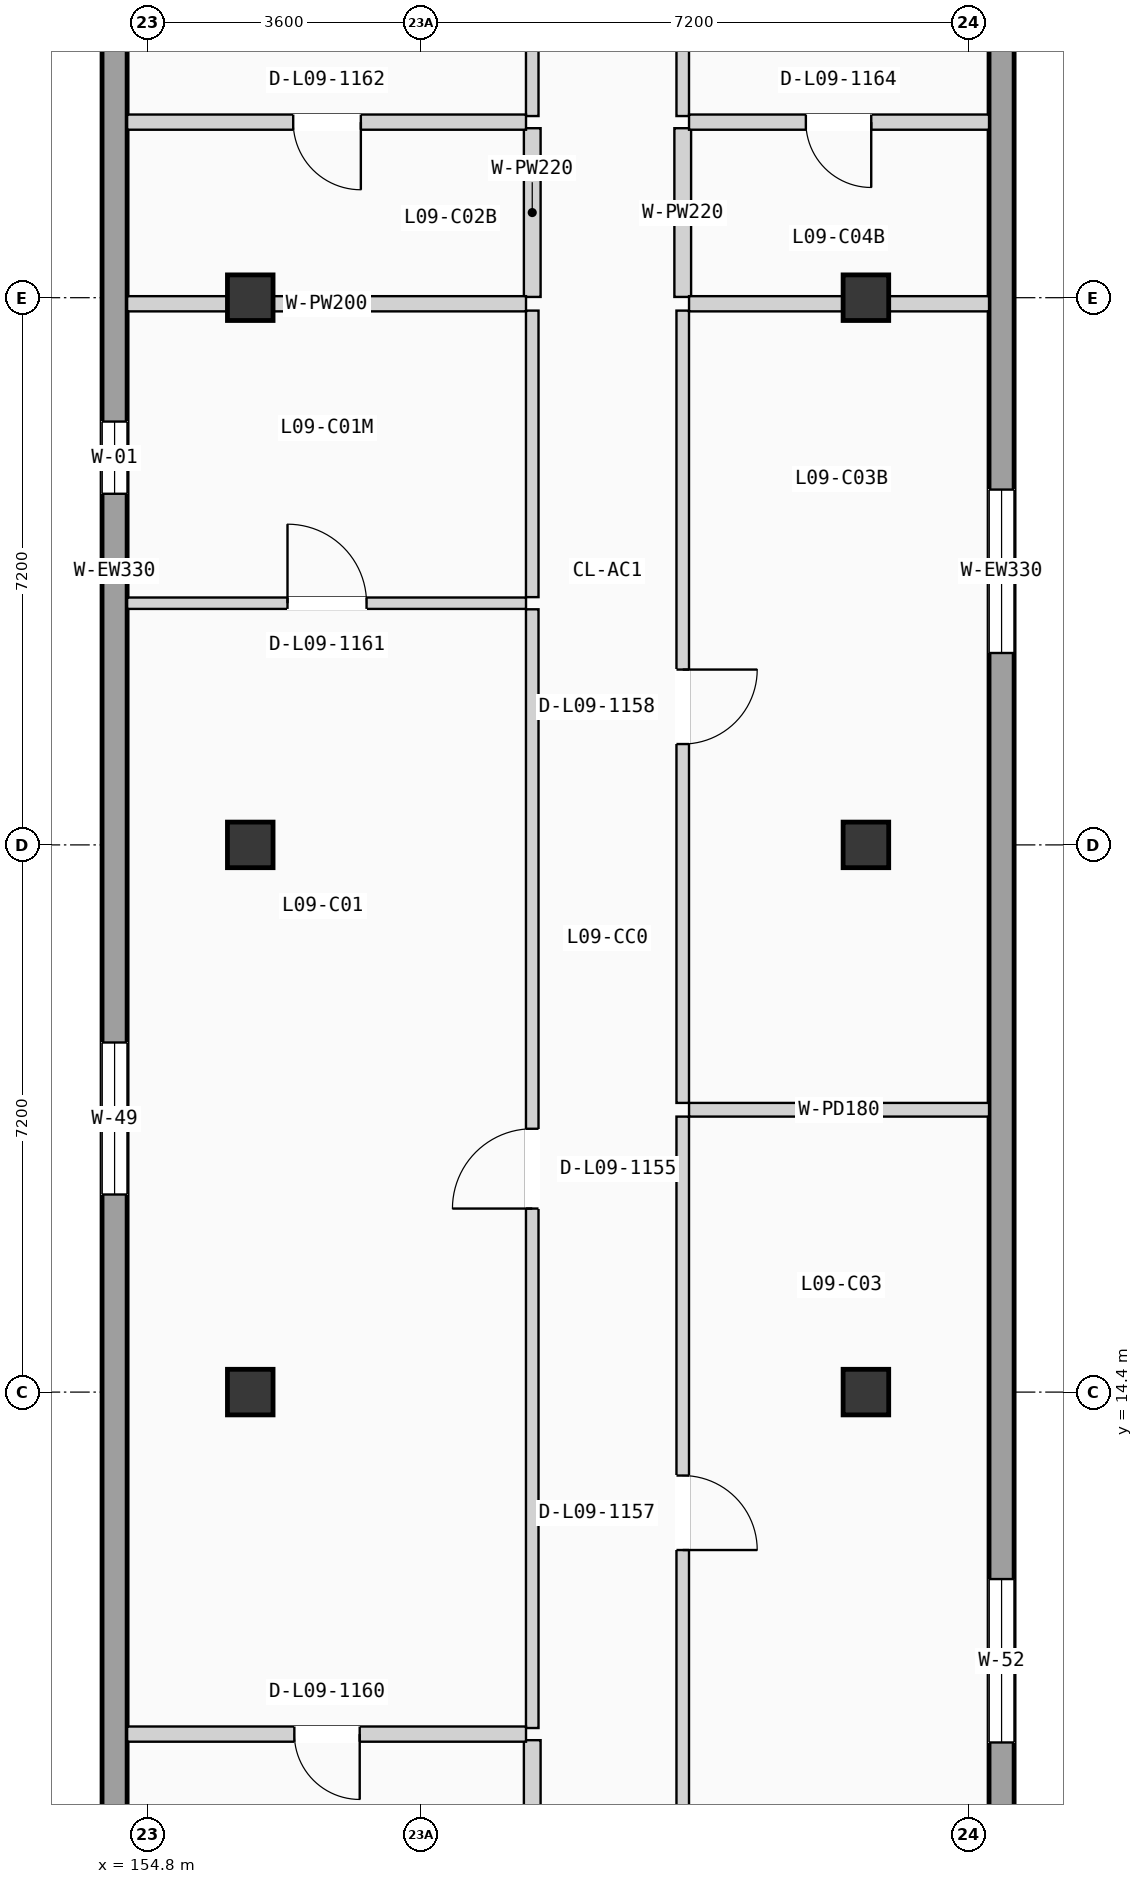
"""IFC4 building model, lengths in metres.
Left out: names, types, materials, properties, quantities, classifications, styles, units other than length and angle.
Written with IfcOpenShell. Run it as: python <this file> out.ifc"""

import sys

from ifc_helpers import new_model, si_unit, direction, frame, frame_2d, origin, origin_2d, place, context, subcontext, project, spatial, rectangle, extrude, element, fill, save


model = new_model("IFC4")
c1 = context("Model", 3, precision=1e-05, world=origin(), true_north=direction((0.0, 1.0)))
c2 = subcontext(c1, "Body", "Model", "MODEL_VIEW")
j1 = project(units=[si_unit("LENGTHUNIT", "METRE"), si_unit("PLANEANGLEUNIT", "RADIAN")], contexts=[c1])
p1 = place(None, origin())
s1 = spatial("IfcSite", under=j1, at=p1, CompositionType="ELEMENT")
p2 = place(p1, origin())
s2 = spatial("IfcBuilding", under=s1, at=p2, CompositionType="ELEMENT")
p3 = place(p2, frame((0.0, 0.0, 30.975)))
s3 = spatial("IfcBuildingStorey", under=s2, at=p3, CompositionType="ELEMENT", Elevation=30.975)
for number, where, z_axis, x_axis in (
    (1, (156.15, 14.4, 0.0), (0.0, 0.0, 1.0), (1.0, 0.0, 0.0)),
    (2, (156.15, 21.6, 0.0), (0.0, 0.0, 1.0), (1.0, 0.0, 0.0)),
    (3, (156.15, 28.8, 0.0), (0.0, 0.0, 1.0), (1.0, 0.0, 0.0)),
    (4, (164.25, 14.4, 0.0), (0.0, 0.0, 1.0), (1.0, 0.0, 0.0)),
    (5, (164.25, 21.6, 0.0), (0.0, 0.0, 1.0), (1.0, 0.0, 0.0)),
    (6, (164.25, 28.8, 0.0), (0.0, 0.0, 1.0), (1.0, 0.0, 0.0)),
):
    element("IfcColumn", number, at=place(p3, frame(where, z_axis=z_axis, x_axis=x_axis)), inside=s3, PredefinedType="COLUMN", context=c2, shape_type="SweptSolid", body=[
        extrude(rectangle(XDim=0.6, YDim=0.6, at=origin_2d()), origin(), (0.0, 0.0, 1.0), 3.15),
    ])
p4 = place(p3, frame((154.365, 0.33, 0.0), z_axis=(0.0, 0.0, 1.0), x_axis=(0.0, 1.0, 0.0)))
e7 = element("IfcWall", 7, at=p4, inside=s3, PredefinedType="SOLIDWALL", context=c2, shape_type="SweptSolid", body=[
    extrude(rectangle(XDim=49.74, YDim=0.33, at=frame_2d((24.87, 0.0))), origin(), (0.0, 0.0, 1.0), 2.9),
])
p5 = place(p4, frame((16.67, 0.0, 0.515)))
e8 = element("IfcOpeningElement", 8, at=p5, cuts=e7, PredefinedType="OPENING", context=c2, shape_type="SweptSolid", body=[
    extrude(rectangle(XDim=2.0, YDim=1.65, at=frame_2d((1.0, 0.825))), frame((0.0, 0.175, 0.0), z_axis=(0.0, -1.0, 0.0), x_axis=(1.0, 0.0, 0.0)), (0.0, 0.0, 1.0), 0.35),
])
p6 = place(p4, frame((25.89, 0.0, 0.85)))
e9 = element("IfcOpeningElement", 9, at=p6, cuts=e7, PredefinedType="OPENING", context=c2, shape_type="SweptSolid", body=[
    extrude(rectangle(XDim=0.95, YDim=1.2, at=frame_2d((0.475, 0.6))), frame((0.0, 0.175, 0.0), z_axis=(0.0, -1.0, 0.0), x_axis=(1.0, 0.0, 0.0)), (0.0, 0.0, 1.0), 0.35),
])
p7 = place(p4, frame((32.055, 0.0, 0.9)))
e10 = element("IfcOpeningElement", 10, at=p7, cuts=e7, PredefinedType="OPENING", context=c2, shape_type="SweptSolid", body=[
    extrude(rectangle(XDim=2.15, YDim=1.2, at=frame_2d((1.075, 0.6))), frame((0.0, 0.175, 0.0), z_axis=(0.0, -1.0, 0.0), x_axis=(1.0, 0.0, 0.0)), (0.0, 0.0, 1.0), 0.35),
])
p8 = place(p3, frame((166.035, 0.33, 0.0), z_axis=(0.0, 0.0, 1.0), x_axis=(0.0, 1.0, 0.0)))
e11 = element("IfcWall", 11, at=p8, inside=s3, PredefinedType="SOLIDWALL", context=c2, shape_type="SweptSolid", body=[
    extrude(rectangle(XDim=49.74, YDim=0.33, at=frame_2d((24.87, 0.0))), origin(), (0.0, 0.0, 1.0), 2.9),
])
p9 = place(p8, frame((9.46, 0.0, 0.815)))
e12 = element("IfcOpeningElement", 12, at=p9, cuts=e11, PredefinedType="OPENING", context=c2, shape_type="SweptSolid", body=[
    extrude(rectangle(XDim=2.15, YDim=1.35, at=frame_2d((1.075, 0.675))), frame((0.0, 0.175, 0.0), z_axis=(0.0, -1.0, 0.0), x_axis=(1.0, 0.0, 0.0)), (0.0, 0.0, 1.0), 0.35),
])
p10 = place(p8, frame((23.795, 0.0, 0.665)))
e13 = element("IfcOpeningElement", 13, at=p10, cuts=e11, PredefinedType="OPENING", context=c2, shape_type="SweptSolid", body=[
    extrude(rectangle(XDim=2.15, YDim=1.5, at=frame_2d((1.075, 0.75))), frame((0.0, 0.175, 0.0), z_axis=(0.0, -1.0, 0.0), x_axis=(1.0, 0.0, 0.0)), (0.0, 0.0, 1.0), 0.35),
])
p11 = place(p8, frame((32.055, 0.0, 0.515)))
e14 = element("IfcOpeningElement", 14, at=p11, cuts=e11, PredefinedType="OPENING", context=c2, shape_type="SweptSolid", body=[
    extrude(rectangle(XDim=2.15, YDim=1.65, at=frame_2d((1.075, 0.825))), frame((0.0, 0.175, 0.0), z_axis=(0.0, -1.0, 0.0), x_axis=(1.0, 0.0, 0.0)), (0.0, 0.0, 1.0), 0.35),
])
p12 = place(p3, frame((159.86, 7.6, 0.0), z_axis=(0.0, 0.0, 1.0), x_axis=(0.0, 1.0, 0.0)))
e15 = element("IfcWall", 15, at=p12, inside=s3, PredefinedType="PLUMBINGWALL", context=c2, shape_type="SweptSolid", body=[
    extrude(rectangle(XDim=2.22, YDim=0.22, at=frame_2d((1.11, 0.0))), origin(), (0.0, 0.0, 1.0), 2.87),
])
p13 = place(p3, frame((159.86, 9.98, 0.0), z_axis=(0.0, 0.0, 1.0), x_axis=(0.0, 1.0, 0.0)))
e16 = element("IfcWall", 16, at=p13, inside=s3, PredefinedType="PARTITIONING", context=c2, shape_type="SweptSolid", body=[
    extrude(rectangle(XDim=14.72, YDim=0.165, at=frame_2d((7.36, 0.0))), origin(), (0.0, 0.0, 1.0), 2.87),
])
p14 = place(p13, frame((6.835, 0.0, 0.0)))
e17 = element("IfcOpeningElement", 17, at=p14, cuts=e16, PredefinedType="OPENING", context=c2, shape_type="SweptSolid", body=[
    extrude(rectangle(XDim=1.05, YDim=2.13, at=frame_2d((0.525, 1.065))), frame((0.0, 0.093, 0.0), z_axis=(0.0, -1.0, 0.0), x_axis=(1.0, 0.0, 0.0)), (0.0, 0.0, 1.0), 0.185),
])
p15 = place(p3, frame((159.86, 24.86, 0.0), z_axis=(0.0, 0.0, 1.0), x_axis=(0.0, 1.0, 0.0)))
e18 = element("IfcWall", 18, at=p15, inside=s3, PredefinedType="PARTITIONING", context=c2, shape_type="SweptSolid", body=[
    extrude(rectangle(XDim=3.77, YDim=0.165, at=frame_2d((1.885, 0.0))), origin(), (0.0, 0.0, 1.0), 2.87),
])
p16 = place(p3, frame((159.86, 28.81, 0.0), z_axis=(0.0, 0.0, 1.0), x_axis=(0.0, 1.0, 0.0)))
e19 = element("IfcWall", 19, at=p16, inside=s3, PredefinedType="PLUMBINGWALL", context=c2, shape_type="SweptSolid", body=[
    extrude(rectangle(XDim=2.22, YDim=0.22, at=frame_2d((1.11, 0.0))), origin(), (0.0, 0.0, 1.0), 2.87),
])
p17 = place(p3, frame((159.86, 31.19, 0.0), z_axis=(0.0, 0.0, 1.0), x_axis=(0.0, 1.0, 0.0)))
e20 = element("IfcWall", 20, at=p17, inside=s3, PredefinedType="PARTITIONING", context=c2, shape_type="SweptSolid", body=[
    extrude(rectangle(XDim=7.68, YDim=0.165, at=frame_2d((3.84, 0.0))), origin(), (0.0, 0.0, 1.0), 2.87),
])
p18 = place(p17, frame((3.315, 0.0, 0.0)))
e21 = element("IfcOpeningElement", 21, at=p18, cuts=e20, PredefinedType="OPENING", context=c2, shape_type="SweptSolid", body=[
    extrude(rectangle(XDim=1.05, YDim=2.13, at=frame_2d((0.525, 1.065))), frame((0.0, 0.093, 0.0), z_axis=(0.0, -1.0, 0.0), x_axis=(1.0, 0.0, 0.0)), (0.0, 0.0, 1.0), 0.185),
])
p19 = place(p3, frame((161.84, 7.545, 0.0), z_axis=(0.0, 0.0, 1.0), x_axis=(0.0, 1.0, 0.0)))
e22 = element("IfcWall", 22, at=p19, inside=s3, PredefinedType="PARTITIONING", context=c2, shape_type="SweptSolid", body=[
    extrude(rectangle(XDim=10.48, YDim=0.165, at=frame_2d((5.24, 0.0))), origin(), (0.0, 0.0, 1.0), 2.87),
])
p20 = place(p19, frame((4.777, 0.0, 0.0)))
e23 = element("IfcOpeningElement", 23, at=p20, cuts=e22, PredefinedType="OPENING", context=c2, shape_type="SweptSolid", body=[
    extrude(rectangle(XDim=0.98, YDim=2.08, at=frame_2d((0.49, 1.04))), frame((0.0, 0.093, 0.0), z_axis=(0.0, -1.0, 0.0), x_axis=(1.0, 0.0, 0.0)), (0.0, 0.0, 1.0), 0.185),
])
p21 = place(p3, frame((161.84, 18.205, 0.0), z_axis=(0.0, 0.0, 1.0), x_axis=(0.0, 1.0, 0.0)))
e24 = element("IfcWall", 24, at=p21, inside=s3, PredefinedType="PARTITIONING", context=c2, shape_type="SweptSolid", body=[
    extrude(rectangle(XDim=10.425, YDim=0.165, at=frame_2d((5.212, 0.0))), origin(), (0.0, 0.0, 1.0), 2.87),
])
p22 = place(p21, frame((4.722, 0.0, 0.0)))
e25 = element("IfcOpeningElement", 25, at=p22, cuts=e24, PredefinedType="OPENING", context=c2, shape_type="SweptSolid", body=[
    extrude(rectangle(XDim=0.98, YDim=2.08, at=frame_2d((0.49, 1.04))), frame((0.0, 0.093, 0.0), z_axis=(0.0, -1.0, 0.0), x_axis=(1.0, 0.0, 0.0)), (0.0, 0.0, 1.0), 0.185),
])
p23 = place(p3, frame((161.84, 28.81, 0.0), z_axis=(0.0, 0.0, 1.0), x_axis=(0.0, 1.0, 0.0)))
e26 = element("IfcWall", 26, at=p23, inside=s3, PredefinedType="PLUMBINGWALL", context=c2, shape_type="SweptSolid", body=[
    extrude(rectangle(XDim=2.22, YDim=0.22, at=frame_2d((1.11, 0.0))), origin(), (0.0, 0.0, 1.0), 2.87),
])
p24 = place(p3, frame((161.84, 31.19, 0.0), z_axis=(0.0, 0.0, 1.0), x_axis=(0.0, 1.0, 0.0)))
e27 = element("IfcWall", 27, at=p24, inside=s3, PredefinedType="PARTITIONING", context=c2, shape_type="SweptSolid", body=[
    extrude(rectangle(XDim=7.68, YDim=0.165, at=frame_2d((3.84, 0.0))), origin(), (0.0, 0.0, 1.0), 2.87),
])
p25 = place(p24, frame((3.315, 0.0, 0.0)))
e28 = element("IfcOpeningElement", 28, at=p25, cuts=e27, PredefinedType="OPENING", context=c2, shape_type="SweptSolid", body=[
    extrude(rectangle(XDim=1.05, YDim=2.13, at=frame_2d((0.525, 1.065))), frame((0.0, 0.093, 0.0), z_axis=(0.0, -1.0, 0.0), x_axis=(1.0, 0.0, 0.0)), (0.0, 0.0, 1.0), 0.185),
])
p26 = place(p3, frame((154.53, 9.9, 0.0), z_axis=(0.0, 0.0, 1.0), x_axis=(1.0, 0.0, 0.0)))
e29 = element("IfcWall", 29, at=p26, inside=s3, PredefinedType="PLUMBINGWALL", context=c2, shape_type="SweptSolid", body=[
    extrude(rectangle(XDim=5.248, YDim=0.2, at=frame_2d((2.624, 0.0))), origin(), (0.0, 0.0, 1.0), 2.87),
])
p27 = place(p26, frame((2.2, 0.0, 0.0)))
e30 = element("IfcOpeningElement", 30, at=p27, cuts=e29, PredefinedType="OPENING", context=c2, shape_type="SweptSolid", body=[
    extrude(rectangle(XDim=0.86, YDim=2.0, at=frame_2d((0.43, 1.0))), frame((0.0, 0.11, 0.0), z_axis=(0.0, -1.0, 0.0), x_axis=(1.0, 0.0, 0.0)), (0.0, 0.0, 1.0), 0.22),
])
p28 = place(p3, frame((154.53, 24.78, 0.0), z_axis=(0.0, 0.0, 1.0), x_axis=(1.0, 0.0, 0.0)))
e31 = element("IfcWall", 31, at=p28, inside=s3, PredefinedType="PARTITIONING", context=c2, shape_type="SweptSolid", body=[
    extrude(rectangle(XDim=5.248, YDim=0.15, at=frame_2d((2.624, 0.0))), origin(), (0.0, 0.0, 1.0), 2.87),
])
p29 = place(p28, frame((2.11, 0.0, 0.0)))
e32 = element("IfcOpeningElement", 32, at=p29, cuts=e31, PredefinedType="OPENING", context=c2, shape_type="SweptSolid", body=[
    extrude(rectangle(XDim=1.04, YDim=2.08, at=frame_2d((0.52, 1.04))), frame((0.0, 0.085, 0.0), z_axis=(0.0, -1.0, 0.0), x_axis=(1.0, 0.0, 0.0)), (0.0, 0.0, 1.0), 0.17),
])
p30 = place(p3, frame((154.53, 28.72, 0.0), z_axis=(0.0, 0.0, 1.0), x_axis=(1.0, 0.0, 0.0)))
e33 = element("IfcWall", 33, at=p30, inside=s3, PredefinedType="PLUMBINGWALL", context=c2, shape_type="SweptSolid", body=[
    extrude(rectangle(XDim=5.248, YDim=0.2, at=frame_2d((2.624, 0.0))), origin(), (0.0, 0.0, 1.0), 2.17),
])
p31 = place(p3, frame((154.53, 31.11, 0.0), z_axis=(0.0, 0.0, 1.0), x_axis=(1.0, 0.0, 0.0)))
e34 = element("IfcWall", 34, at=p31, inside=s3, PredefinedType="PLUMBINGWALL", context=c2, shape_type="SweptSolid", body=[
    extrude(rectangle(XDim=5.248, YDim=0.2, at=frame_2d((2.624, 0.0))), origin(), (0.0, 0.0, 1.0), 2.87),
])
p32 = place(p31, frame((2.185, 0.0, 0.0)))
e35 = element("IfcOpeningElement", 35, at=p32, cuts=e34, PredefinedType="OPENING", context=c2, shape_type="SweptSolid", body=[
    extrude(rectangle(XDim=0.89, YDim=2.03, at=frame_2d((0.445, 1.015))), frame((0.0, 0.11, 0.0), z_axis=(0.0, -1.0, 0.0), x_axis=(1.0, 0.0, 0.0)), (0.0, 0.0, 1.0), 0.22),
])
p33 = place(p3, frame((161.923, 18.115, 0.0), z_axis=(0.0, 0.0, 1.0), x_axis=(1.0, 0.0, 0.0)))
e36 = element("IfcWall", 36, at=p33, inside=s3, PredefinedType="PARTITIONING", context=c2, shape_type="SweptSolid", body=[
    extrude(rectangle(XDim=3.947, YDim=0.18, at=frame_2d((1.974, 0.0))), origin(), (0.0, 0.0, 1.0), 2.87),
])
p34 = place(p3, frame((161.923, 28.72, 0.0), z_axis=(0.0, 0.0, 1.0), x_axis=(1.0, 0.0, 0.0)))
e37 = element("IfcWall", 37, at=p34, inside=s3, PredefinedType="PLUMBINGWALL", context=c2, shape_type="SweptSolid", body=[
    extrude(rectangle(XDim=3.947, YDim=0.2, at=frame_2d((1.974, 0.0))), origin(), (0.0, 0.0, 1.0), 2.17),
])
p35 = place(p3, frame((161.923, 31.11, 0.0), z_axis=(0.0, 0.0, 1.0), x_axis=(1.0, 0.0, 0.0)))
e38 = element("IfcWall", 38, at=p35, inside=s3, PredefinedType="PLUMBINGWALL", context=c2, shape_type="SweptSolid", body=[
    extrude(rectangle(XDim=3.947, YDim=0.2, at=frame_2d((1.974, 0.0))), origin(), (0.0, 0.0, 1.0), 2.87),
])
p36 = place(p35, frame((1.537, 0.0, 0.0)))
e39 = element("IfcOpeningElement", 39, at=p36, cuts=e38, PredefinedType="OPENING", context=c2, shape_type="SweptSolid", body=[
    extrude(rectangle(XDim=0.86, YDim=2.0, at=frame_2d((0.43, 1.0))), frame((0.0, 0.11, 0.0), z_axis=(0.0, -1.0, 0.0), x_axis=(1.0, 0.0, 0.0)), (0.0, 0.0, 1.0), 0.22),
])
p37 = place(p5, origin())
e40 = element("IfcWindow", 40, at=p37, inside=s3, PartitioningType="DOUBLE_PANEL_VERTICAL", PredefinedType="WINDOW", context=c2, shape_type="SweptSolid", body=[
    extrude(rectangle(XDim=2.0, YDim=1.65, at=frame_2d((1.0, 0.825))), frame((0.0, 0.03, 0.0), z_axis=(0.0, -1.0, 0.0), x_axis=(1.0, 0.0, 0.0)), (0.0, 0.0, 1.0), 0.06),
])
fill(e8, e40)
p38 = place(p6, origin())
e41 = element("IfcWindow", 41, at=p38, inside=s3, PartitioningType="SINGLE_PANEL", PredefinedType="WINDOW", context=c2, shape_type="SweptSolid", body=[
    extrude(rectangle(XDim=0.95, YDim=1.2, at=frame_2d((0.475, 0.6))), frame((0.0, 0.03, 0.0), z_axis=(0.0, -1.0, 0.0), x_axis=(1.0, 0.0, 0.0)), (0.0, 0.0, 1.0), 0.06),
])
fill(e9, e41)
p39 = place(p9, origin())
e42 = element("IfcWindow", 42, at=p39, inside=s3, PartitioningType="DOUBLE_PANEL_VERTICAL", PredefinedType="WINDOW", context=c2, shape_type="SweptSolid", body=[
    extrude(rectangle(XDim=2.15, YDim=1.35, at=frame_2d((1.075, 0.675))), frame((0.0, 0.03, 0.0), z_axis=(0.0, -1.0, 0.0), x_axis=(1.0, 0.0, 0.0)), (0.0, 0.0, 1.0), 0.06),
])
fill(e12, e42)
p40 = place(p10, origin())
e43 = element("IfcWindow", 43, at=p40, inside=s3, PartitioningType="DOUBLE_PANEL_VERTICAL", PredefinedType="WINDOW", context=c2, shape_type="SweptSolid", body=[
    extrude(rectangle(XDim=2.15, YDim=1.5, at=frame_2d((1.075, 0.75))), frame((0.0, 0.03, 0.0), z_axis=(0.0, -1.0, 0.0), x_axis=(1.0, 0.0, 0.0)), (0.0, 0.0, 1.0), 0.06),
])
fill(e13, e43)
p41 = place(p14, origin())
e44 = element("IfcDoor", 44, at=p41, inside=s3, OperationType="SINGLE_SWING_LEFT", PredefinedType="DOOR", context=c2, shape_type="SweptSolid", body=[
    extrude(rectangle(XDim=1.05, YDim=2.13, at=frame_2d((0.525, 1.065))), frame((0.0, 0.025, 0.0), z_axis=(0.0, -1.0, 0.0), x_axis=(1.0, 0.0, 0.0)), (0.0, 0.0, 1.0), 0.05),
])
fill(e17, e44)
p42 = place(p20, frame((0.98, 0.0, 0.0), z_axis=(0.0, 0.0, 1.0), x_axis=(-1.0, 0.0, 0.0)))
e45 = element("IfcDoor", 45, at=p42, inside=s3, OperationType="SINGLE_SWING_LEFT", PredefinedType="DOOR", context=c2, shape_type="SweptSolid", body=[
    extrude(rectangle(XDim=0.98, YDim=2.08, at=frame_2d((0.49, 1.04))), frame((0.0, 0.025, 0.0), z_axis=(0.0, -1.0, 0.0), x_axis=(1.0, 0.0, 0.0)), (0.0, 0.0, 1.0), 0.05),
])
fill(e23, e45)
p43 = place(p22, frame((0.98, 0.0, 0.0), z_axis=(0.0, 0.0, 1.0), x_axis=(-1.0, 0.0, 0.0)))
e46 = element("IfcDoor", 46, at=p43, inside=s3, OperationType="SINGLE_SWING_RIGHT", PredefinedType="DOOR", context=c2, shape_type="SweptSolid", body=[
    extrude(rectangle(XDim=0.98, YDim=2.08, at=frame_2d((0.49, 1.04))), frame((0.0, 0.025, 0.0), z_axis=(0.0, -1.0, 0.0), x_axis=(1.0, 0.0, 0.0)), (0.0, 0.0, 1.0), 0.05),
])
fill(e25, e46)
p44 = place(p27, frame((0.86, 0.0, 0.0), z_axis=(0.0, 0.0, 1.0), x_axis=(-1.0, 0.0, 0.0)))
e47 = element("IfcDoor", 47, at=p44, inside=s3, OperationType="SINGLE_SWING_RIGHT", PredefinedType="DOOR", context=c2, shape_type="SweptSolid", body=[
    extrude(rectangle(XDim=0.86, YDim=2.0, at=frame_2d((0.43, 1.0))), frame((0.0, 0.025, 0.0), z_axis=(0.0, -1.0, 0.0), x_axis=(1.0, 0.0, 0.0)), (0.0, 0.0, 1.0), 0.05),
])
fill(e30, e47)
p45 = place(p29, origin())
e48 = element("IfcDoor", 48, at=p45, inside=s3, OperationType="SINGLE_SWING_LEFT", PredefinedType="DOOR", context=c2, shape_type="SweptSolid", body=[
    extrude(rectangle(XDim=1.04, YDim=2.08, at=frame_2d((0.52, 1.04))), frame((0.0, 0.025, 0.0), z_axis=(0.0, -1.0, 0.0), x_axis=(1.0, 0.0, 0.0)), (0.0, 0.0, 1.0), 0.05),
])
fill(e32, e48)
p46 = place(p32, frame((0.89, 0.0, 0.0), z_axis=(0.0, 0.0, 1.0), x_axis=(-1.0, 0.0, 0.0)))
e49 = element("IfcDoor", 49, at=p46, inside=s3, OperationType="SINGLE_SWING_RIGHT", PredefinedType="DOOR", context=c2, shape_type="SweptSolid", body=[
    extrude(rectangle(XDim=0.89, YDim=2.03, at=frame_2d((0.445, 1.015))), frame((0.0, 0.025, 0.0), z_axis=(0.0, -1.0, 0.0), x_axis=(1.0, 0.0, 0.0)), (0.0, 0.0, 1.0), 0.05),
])
fill(e35, e49)
p47 = place(p36, frame((0.86, 0.0, 0.0), z_axis=(0.0, 0.0, 1.0), x_axis=(-1.0, 0.0, 0.0)))
e50 = element("IfcDoor", 50, at=p47, inside=s3, OperationType="SINGLE_SWING_RIGHT", PredefinedType="DOOR", context=c2, shape_type="SweptSolid", body=[
    extrude(rectangle(XDim=0.86, YDim=2.0, at=frame_2d((0.43, 1.0))), frame((0.0, 0.025, 0.0), z_axis=(0.0, -1.0, 0.0), x_axis=(1.0, 0.0, 0.0)), (0.0, 0.0, 1.0), 0.05),
])
fill(e39, e50)
save(model, sys.argv[1])
